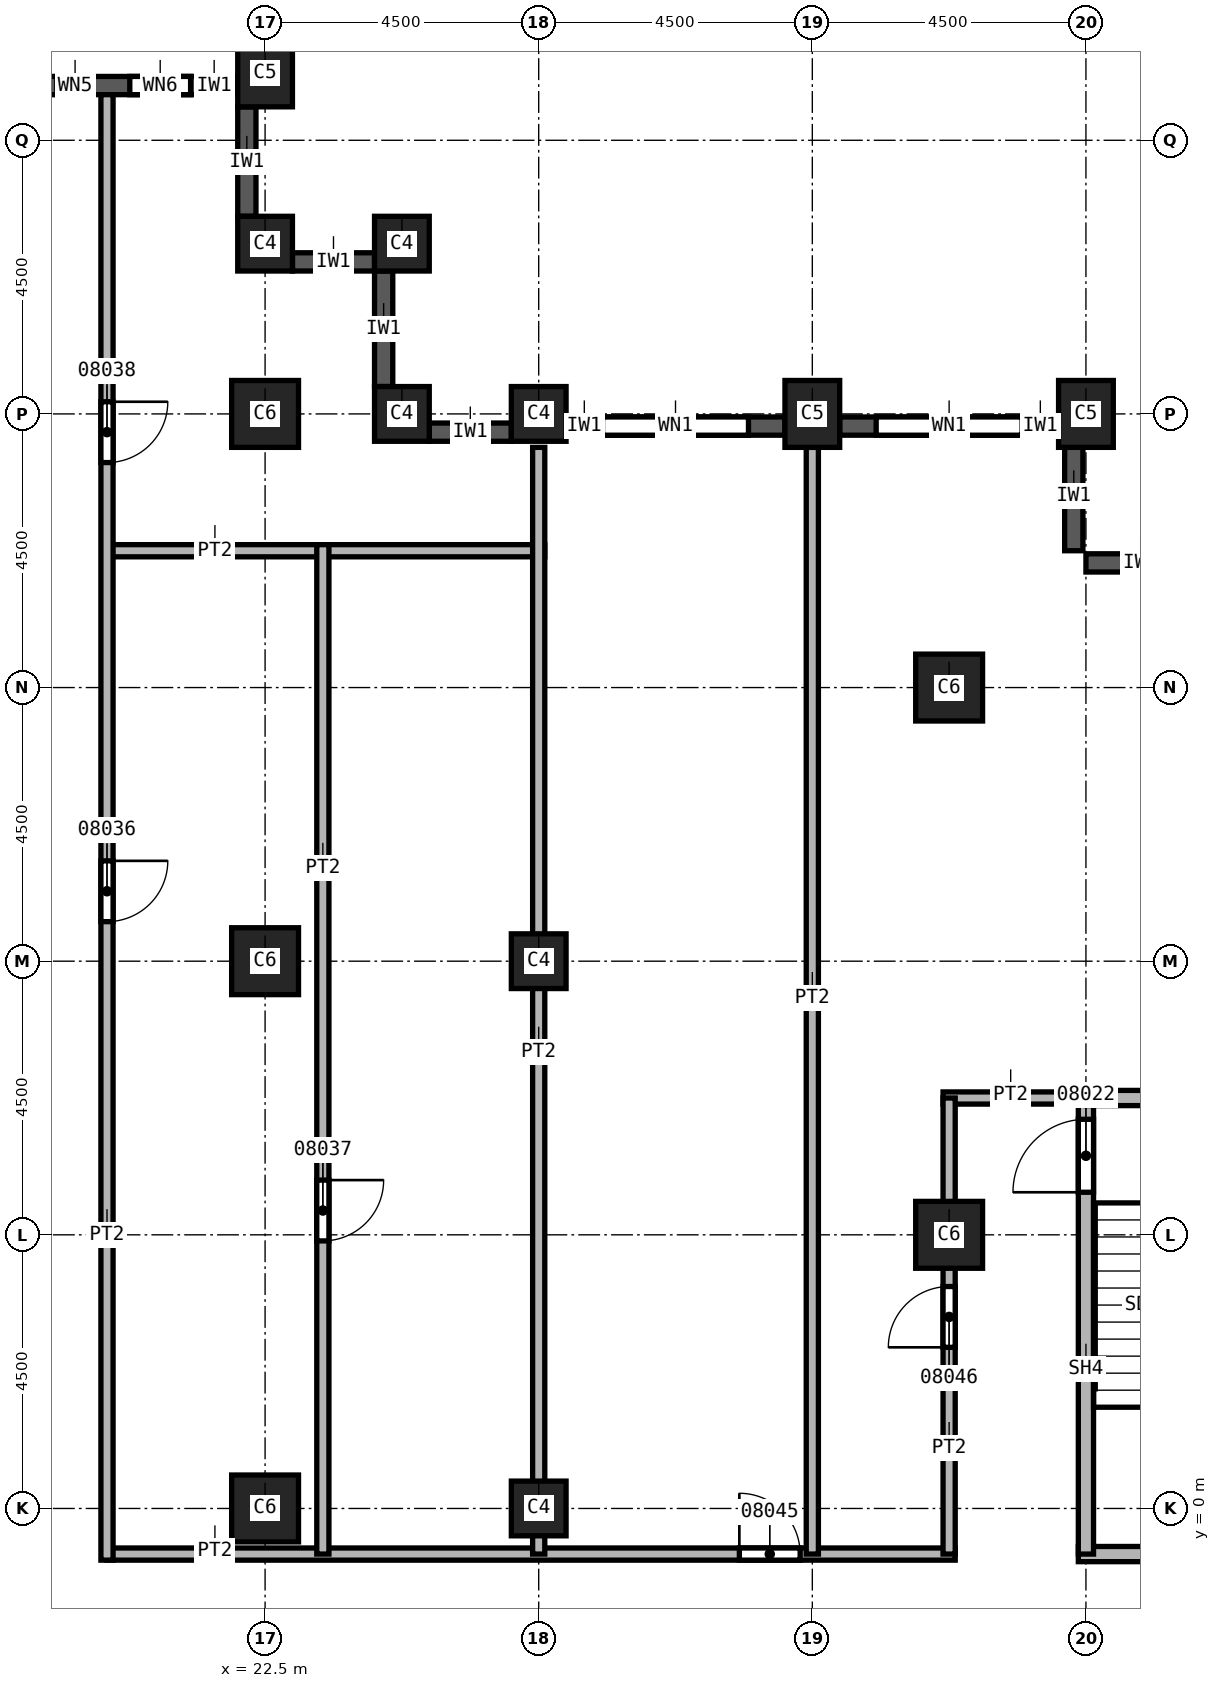
"""IFC4 building model, lengths in metres.
Left out: names, types, materials, properties, quantities, classifications, styles, units other than length and angle.
Written with IfcOpenShell. Run it as: python <this file> out.ifc"""

import sys

from ifc_helpers import new_model, si_unit, direction, frame, frame_2d, origin, origin_2d, place, context, subcontext, project, spatial, rectangle, extrude, element, fill, save


model = new_model("IFC4")
c1 = context("Model", 3, precision=1e-05, world=origin(), true_north=direction((0.0, 1.0)))
c2 = subcontext(c1, "Body", "Model", "MODEL_VIEW")
j1 = project(units=[si_unit("LENGTHUNIT", "METRE"), si_unit("PLANEANGLEUNIT", "RADIAN")], contexts=[c1])
p1 = place(None, origin())
s1 = spatial("IfcSite", under=j1, at=p1, CompositionType="ELEMENT")
p2 = place(p1, origin())
s2 = spatial("IfcBuilding", under=s1, at=p2, CompositionType="ELEMENT")
p3 = place(p2, frame((0.0, 0.0, 150.0)))
s3 = spatial("IfcBuildingStorey", under=s2, at=p3, CompositionType="ELEMENT", Elevation=150.0)
for number, where, z_axis, x_axis in (
    (1, (31.5, 18.0, 0.0), (0.0, 0.0, 1.0), (1.0, 0.0, 0.0)),
    (2, (36.0, 18.0, 0.0), (0.0, 0.0, 1.0), (1.0, 0.0, 0.0)),
):
    element("IfcColumn", number, at=place(p3, frame(where, z_axis=z_axis, x_axis=x_axis)), inside=s3, PredefinedType="COLUMN", context=c2, shape_type="SweptSolid", body=[
        extrude(rectangle(XDim=0.9, YDim=1.1, at=origin_2d()), origin(), (0.0, 0.0, 1.0), 3.7),
    ])
for number, where, z_axis, x_axis in (
    (3, (33.75, 4.5, 0.0), (0.0, 0.0, 1.0), (1.0, 0.0, 0.0)),
    (4, (33.75, 13.5, 0.0), (0.0, 0.0, 1.0), (1.0, 0.0, 0.0)),
    (5, (22.5, 0.0, 0.0), (0.0, 0.0, 1.0), (1.0, 0.0, 0.0)),
    (6, (22.5, 9.0, 0.0), (0.0, 0.0, 1.0), (1.0, 0.0, 0.0)),
    (7, (22.5, 18.0, 0.0), (0.0, 0.0, 1.0), (1.0, 0.0, 0.0)),
):
    element("IfcColumn", number, at=place(p3, frame(where, z_axis=z_axis, x_axis=x_axis)), inside=s3, PredefinedType="COLUMN", context=c2, shape_type="SweptSolid", body=[
        extrude(rectangle(XDim=1.1, YDim=1.1, at=origin_2d()), origin(), (0.0, 0.0, 1.0), 3.7),
    ])
for number, where, z_axis, x_axis in (
    (8, (27.0, 0.0, 0.0), (0.0, 0.0, 1.0), (1.0, 0.0, 0.0)),
    (9, (27.0, 9.0, 0.0), (0.0, 0.0, 1.0), (1.0, 0.0, 0.0)),
    (10, (27.0, 18.0, 0.0), (0.0, 0.0, 1.0), (1.0, 0.0, 0.0)),
):
    element("IfcColumn", number, at=place(p3, frame(where, z_axis=z_axis, x_axis=x_axis)), inside=s3, PredefinedType="COLUMN", context=c2, shape_type="SweptSolid", body=[
        extrude(rectangle(XDim=0.9, YDim=0.9, at=origin_2d()), origin(), (0.0, 0.0, 1.0), 3.7),
    ])
p4 = place(p3, frame((22.5, 23.6, 0.0), z_axis=(0.0, 0.0, 1.0), x_axis=(1.0, 0.0, 0.0)))
e11 = element("IfcColumn", 11, at=p4, inside=s3, PredefinedType="COLUMN", context=c2, shape_type="SweptSolid", body=[
    extrude(rectangle(XDim=0.9, YDim=1.1, at=origin_2d()), origin(), (0.0, 0.0, 1.0), 3.7),
])
for number, where, z_axis, x_axis in (
    (12, (22.5, 20.8, 0.0), (0.0, 0.0, 1.0), (1.0, 0.0, 0.0)),
    (13, (24.75, 20.8, 0.0), (0.0, 0.0, 1.0), (1.0, 0.0, 0.0)),
    (14, (24.75, 18.0, 0.0), (0.0, 0.0, 1.0), (1.0, 0.0, 0.0)),
):
    element("IfcColumn", number, at=place(p3, frame(where, z_axis=z_axis, x_axis=x_axis)), inside=s3, PredefinedType="COLUMN", context=c2, shape_type="SweptSolid", body=[
        extrude(rectangle(XDim=0.9, YDim=0.9, at=origin_2d()), origin(), (0.0, 0.0, 1.0), 3.7),
    ])
for number, where, z_axis, x_axis in (
    (15, (37.8, 15.55, 0.0), (0.0, 0.0, 1.0), (-1.0, 0.0, 0.0)),
    (16, (35.8, 17.55, 0.0), (0.0, 0.0, 1.0), (0.0, -1.0, 0.0)),
):
    element("IfcWall", number, at=place(p3, frame(where, z_axis=z_axis, x_axis=x_axis)), inside=s3, PredefinedType="SOLIDWALL", context=c2, shape_type="SweptSolid", body=[
        extrude(rectangle(XDim=1.8, YDim=0.3, at=frame_2d((0.9, 0.0))), origin(), (0.0, 0.0, 1.0), 3.1),
    ])
p5 = place(p3, frame((35.55, 17.8, 0.0), z_axis=(0.0, 0.0, 1.0), x_axis=(-1.0, 0.0, 0.0)))
e17 = element("IfcWall", 17, at=p5, inside=s3, PredefinedType="SOLIDWALL", context=c2, shape_type="SweptSolid", body=[
    extrude(rectangle(XDim=3.6, YDim=0.3, at=frame_2d((1.8, 0.0))), origin(), (0.0, 0.0, 1.0), 3.1),
])
p6 = place(p5, frame((0.6, 0.0, 0.8)))
e18 = element("IfcOpeningElement", 18, at=p6, cuts=e17, PredefinedType="OPENING", context=c2, shape_type="SweptSolid", body=[
    extrude(rectangle(XDim=2.4, YDim=1.95, at=frame_2d((1.2, 0.975))), frame((0.0, 0.15, 0.0), z_axis=(0.0, -1.0, 0.0), x_axis=(1.0, 0.0, 0.0)), (0.0, 0.0, 1.0), 0.3),
])
p7 = place(p3, frame((31.05, 17.8, 0.0), z_axis=(0.0, 0.0, 1.0), x_axis=(-1.0, 0.0, 0.0)))
e19 = element("IfcWall", 19, at=p7, inside=s3, PredefinedType="SOLIDWALL", context=c2, shape_type="SweptSolid", body=[
    extrude(rectangle(XDim=3.6, YDim=0.3, at=frame_2d((1.8, 0.0))), origin(), (0.0, 0.0, 1.0), 3.1),
])
p8 = place(p7, frame((0.6, 0.0, 0.8)))
e20 = element("IfcOpeningElement", 20, at=p8, cuts=e19, PredefinedType="OPENING", context=c2, shape_type="SweptSolid", body=[
    extrude(rectangle(XDim=2.4, YDim=1.95, at=frame_2d((1.2, 0.975))), frame((0.0, 0.15, 0.0), z_axis=(0.0, -1.0, 0.0), x_axis=(1.0, 0.0, 0.0)), (0.0, 0.0, 1.0), 0.3),
])
p9 = place(p3, frame((26.55, 17.7, 0.0), z_axis=(0.0, 0.0, 1.0), x_axis=(-1.0, 0.0, 0.0)))
e21 = element("IfcWall", 21, at=p9, inside=s3, PredefinedType="SOLIDWALL", context=c2, shape_type="SweptSolid", body=[
    extrude(rectangle(XDim=1.35, YDim=0.3, at=frame_2d((0.675, 0.0))), origin(), (0.0, 0.0, 1.0), 3.1),
])
p10 = place(p3, frame((24.45, 18.45, 0.0), z_axis=(0.0, 0.0, 1.0), x_axis=(0.0, 1.0, 0.0)))
e22 = element("IfcWall", 22, at=p10, inside=s3, PredefinedType="SOLIDWALL", context=c2, shape_type="SweptSolid", body=[
    extrude(rectangle(XDim=1.9, YDim=0.3, at=frame_2d((0.95, 0.0))), origin(), (0.0, 0.0, 1.0), 3.1),
])
p11 = place(p3, frame((24.3, 20.5, 0.0), z_axis=(0.0, 0.0, 1.0), x_axis=(-1.0, 0.0, 0.0)))
e23 = element("IfcWall", 23, at=p11, inside=s3, PredefinedType="SOLIDWALL", context=c2, shape_type="SweptSolid", body=[
    extrude(rectangle(XDim=1.35, YDim=0.3, at=frame_2d((0.675, 0.0))), origin(), (0.0, 0.0, 1.0), 3.1),
])
p12 = place(p3, frame((22.2, 21.25, 0.0), z_axis=(0.0, 0.0, 1.0), x_axis=(0.0, 1.0, 0.0)))
e24 = element("IfcWall", 24, at=p12, inside=s3, PredefinedType="SOLIDWALL", context=c2, shape_type="SweptSolid", body=[
    extrude(rectangle(XDim=1.8, YDim=0.3, at=frame_2d((0.9, 0.0))), origin(), (0.0, 0.0, 1.0), 3.1),
])
p13 = place(p3, frame((22.05, 23.4, 0.0), z_axis=(0.0, 0.0, 1.0), x_axis=(-1.0, 0.0, 0.0)))
e25 = element("IfcWall", 25, at=p13, inside=s3, PredefinedType="SOLIDWALL", context=c2, shape_type="SweptSolid", body=[
    extrude(rectangle(XDim=3.6, YDim=0.3, at=frame_2d((1.8, 0.0))), origin(), (0.0, 0.0, 1.0), 3.1),
])
p14 = place(p13, frame((0.775, 0.0, 0.8)))
e26 = element("IfcOpeningElement", 26, at=p14, cuts=e25, PredefinedType="OPENING", context=c2, shape_type="SweptSolid", body=[
    extrude(rectangle(XDim=1.0, YDim=1.95, at=frame_2d((0.5, 0.975))), frame((0.0, 0.15, 0.0), z_axis=(0.0, -1.0, 0.0), x_axis=(1.0, 0.0, 0.0)), (0.0, 0.0, 1.0), 0.3),
])
p15 = place(p13, frame((2.375, 0.0, 0.8)))
e27 = element("IfcOpeningElement", 27, at=p15, cuts=e25, PredefinedType="OPENING", context=c2, shape_type="SweptSolid", body=[
    extrude(rectangle(XDim=0.6, YDim=1.95, at=frame_2d((0.3, 0.975))), frame((0.0, 0.15, 0.0), z_axis=(0.0, -1.0, 0.0), x_axis=(1.0, 0.0, 0.0)), (0.0, 0.0, 1.0), 0.3),
])
p16 = place(p3, frame((19.9, -0.75, 0.0), z_axis=(0.0, 0.0, 1.0), x_axis=(1.0, 0.0, 0.0)))
e28 = element("IfcWall", 28, at=p16, inside=s3, PredefinedType="PARTITIONING", context=c2, shape_type="SweptSolid", body=[
    extrude(rectangle(XDim=13.95, YDim=0.2, at=frame_2d((6.975, 0.0))), origin(), (0.0, 0.0, 1.0), 3.7),
])
p17 = place(p16, frame((10.4, 0.0, 0.0)))
e29 = element("IfcOpeningElement", 29, at=p17, cuts=e28, PredefinedType="OPENING", context=c2, shape_type="SweptSolid", body=[
    extrude(rectangle(XDim=1.0, YDim=2.1, at=frame_2d((0.5, 1.05))), frame((0.0, 0.1, 0.0), z_axis=(0.0, -1.0, 0.0), x_axis=(1.0, 0.0, 0.0)), (0.0, 0.0, 1.0), 0.2),
])
p18 = place(p3, frame((19.9, 15.75, 0.0), z_axis=(0.0, 0.0, 1.0), x_axis=(1.0, 0.0, 0.0)))
e30 = element("IfcWall", 30, at=p18, inside=s3, PredefinedType="PARTITIONING", context=c2, shape_type="SweptSolid", body=[
    extrude(rectangle(XDim=7.2, YDim=0.2, at=frame_2d((3.6, 0.0))), origin(), (0.0, 0.0, 1.0), 3.7),
])
p19 = place(p3, frame((19.9, 23.25, 0.0), z_axis=(0.0, 0.0, 1.0), x_axis=(0.0, -1.0, 0.0)))
e31 = element("IfcWall", 31, at=p19, inside=s3, PredefinedType="PARTITIONING", context=c2, shape_type="SweptSolid", body=[
    extrude(rectangle(XDim=24.1, YDim=0.2, at=frame_2d((12.05, 0.0))), origin(), (0.0, 0.0, 1.0), 3.7),
])
p20 = place(p19, frame((12.6, 0.0, 0.0)))
e32 = element("IfcOpeningElement", 32, at=p20, cuts=e31, PredefinedType="OPENING", context=c2, shape_type="SweptSolid", body=[
    extrude(rectangle(XDim=1.0, YDim=2.1, at=frame_2d((0.5, 1.05))), frame((0.0, 0.1, 0.0), z_axis=(0.0, -1.0, 0.0), x_axis=(1.0, 0.0, 0.0)), (0.0, 0.0, 1.0), 0.2),
])
p21 = place(p19, frame((5.05, 0.0, 0.0)))
e33 = element("IfcOpeningElement", 33, at=p21, cuts=e31, PredefinedType="OPENING", context=c2, shape_type="SweptSolid", body=[
    extrude(rectangle(XDim=1.0, YDim=2.1, at=frame_2d((0.5, 1.05))), frame((0.0, 0.1, 0.0), z_axis=(0.0, -1.0, 0.0), x_axis=(1.0, 0.0, 0.0)), (0.0, 0.0, 1.0), 0.2),
])
p22 = place(p3, frame((23.45, 15.85, 0.0), z_axis=(0.0, 0.0, 1.0), x_axis=(0.0, -1.0, 0.0)))
e34 = element("IfcWall", 34, at=p22, inside=s3, PredefinedType="PARTITIONING", context=c2, shape_type="SweptSolid", body=[
    extrude(rectangle(XDim=16.6, YDim=0.2, at=frame_2d((8.3, 0.0))), origin(), (0.0, 0.0, 1.0), 3.7),
])
p23 = place(p22, frame((10.45, 0.0, 0.0)))
e35 = element("IfcOpeningElement", 35, at=p23, cuts=e34, PredefinedType="OPENING", context=c2, shape_type="SweptSolid", body=[
    extrude(rectangle(XDim=1.0, YDim=2.1, at=frame_2d((0.5, 1.05))), frame((0.0, 0.1, 0.0), z_axis=(0.0, -1.0, 0.0), x_axis=(1.0, 0.0, 0.0)), (0.0, 0.0, 1.0), 0.2),
])
for number, where, z_axis, x_axis in (
    (36, (27.0, 17.45, 0.0), (0.0, 0.0, 1.0), (0.0, -1.0, 0.0)),
    (37, (31.5, 17.45, 0.0), (0.0, 0.0, 1.0), (0.0, -1.0, 0.0)),
):
    element("IfcWall", number, at=place(p3, frame(where, z_axis=z_axis, x_axis=x_axis)), inside=s3, PredefinedType="PARTITIONING", context=c2, shape_type="SweptSolid", body=[
        extrude(rectangle(XDim=18.2, YDim=0.2, at=frame_2d((9.1, 0.0))), origin(), (0.0, 0.0, 1.0), 3.7),
    ])
p24 = place(p3, frame((33.65, 6.75, 0.0), z_axis=(0.0, 0.0, 1.0), x_axis=(1.0, 0.0, 0.0)))
e38 = element("IfcWall", 38, at=p24, inside=s3, PredefinedType="PARTITIONING", context=c2, shape_type="SweptSolid", body=[
    extrude(rectangle(XDim=2.35, YDim=0.2, at=frame_2d((1.175, 0.0))), origin(), (0.0, 0.0, 1.0), 3.7),
])
p25 = place(p3, frame((33.75, -0.75, 0.0), z_axis=(0.0, 0.0, 1.0), x_axis=(0.0, 1.0, 0.0)))
e39 = element("IfcWall", 39, at=p25, inside=s3, PredefinedType="PARTITIONING", context=c2, shape_type="SweptSolid", body=[
    extrude(rectangle(XDim=7.5, YDim=0.2, at=frame_2d((3.75, 0.0))), origin(), (0.0, 0.0, 1.0), 3.7),
])
p26 = place(p25, frame((3.4, 0.0, 0.0)))
e40 = element("IfcOpeningElement", 40, at=p26, cuts=e39, PredefinedType="OPENING", context=c2, shape_type="SweptSolid", body=[
    extrude(rectangle(XDim=1.0, YDim=2.1, at=frame_2d((0.5, 1.05))), frame((0.0, 0.1, 0.0), z_axis=(0.0, -1.0, 0.0), x_axis=(1.0, 0.0, 0.0)), (0.0, 0.0, 1.0), 0.2),
])
p27 = place(p3, frame((35.875, -0.75, 0.0), z_axis=(0.0, 0.0, 1.0), x_axis=(1.0, 0.0, 0.0)))
e41 = element("IfcWall", 41, at=p27, inside=s3, PredefinedType="SOLIDWALL", context=c2, shape_type="SweptSolid", body=[
    extrude(rectangle(XDim=4.275, YDim=0.25, at=frame_2d((2.137, 0.0))), origin(), (0.0, 0.0, 1.0), 3.7),
])
p28 = place(p3, frame((36.0, -0.75, 0.0), z_axis=(0.0, 0.0, 1.0), x_axis=(0.0, 1.0, 0.0)))
e42 = element("IfcWall", 42, at=p28, inside=s3, PredefinedType="SOLIDWALL", context=c2, shape_type="SweptSolid", body=[
    extrude(rectangle(XDim=7.625, YDim=0.25, at=frame_2d((3.812, 0.0))), origin(), (0.0, 0.0, 1.0), 3.7),
])
p29 = place(p28, frame((5.95, 0.0, 0.0)))
e43 = element("IfcOpeningElement", 43, at=p29, cuts=e42, PredefinedType="OPENING", context=c2, shape_type="SweptSolid", body=[
    extrude(rectangle(XDim=1.2, YDim=2.1, at=frame_2d((0.6, 1.05))), frame((0.0, 0.125, 0.0), z_axis=(0.0, -1.0, 0.0), x_axis=(1.0, 0.0, 0.0)), (0.0, 0.0, 1.0), 0.25),
])
p30 = place(p3, frame((36.0, 6.75, 0.0), z_axis=(0.0, 0.0, 1.0), x_axis=(1.0, 0.0, 0.0)))
e44 = element("IfcWall", 44, at=p30, inside=s3, PredefinedType="SOLIDWALL", context=c2, shape_type="SweptSolid", body=[
    extrude(rectangle(XDim=4.15, YDim=0.25, at=frame_2d((2.075, 0.0))), origin(), (0.0, 0.0, 1.0), 3.7),
])
p31 = place(p6, origin())
e45 = element("IfcWindow", 45, at=p31, inside=s3, PartitioningType="SINGLE_PANEL", PredefinedType="WINDOW", context=c2, shape_type="SweptSolid", body=[
    extrude(rectangle(XDim=2.4, YDim=1.95, at=frame_2d((1.2, 0.975))), frame((0.0, 0.03, 0.0), z_axis=(0.0, -1.0, 0.0), x_axis=(1.0, 0.0, 0.0)), (0.0, 0.0, 1.0), 0.06),
])
fill(e18, e45)
p32 = place(p8, origin())
e46 = element("IfcWindow", 46, at=p32, inside=s3, PartitioningType="SINGLE_PANEL", PredefinedType="WINDOW", context=c2, shape_type="SweptSolid", body=[
    extrude(rectangle(XDim=2.4, YDim=1.95, at=frame_2d((1.2, 0.975))), frame((0.0, 0.03, 0.0), z_axis=(0.0, -1.0, 0.0), x_axis=(1.0, 0.0, 0.0)), (0.0, 0.0, 1.0), 0.06),
])
fill(e20, e46)
p33 = place(p29, origin())
e47 = element("IfcDoor", 47, at=p33, inside=s3, OperationType="SINGLE_SWING_LEFT", PredefinedType="DOOR", context=c2, shape_type="SweptSolid", body=[
    extrude(rectangle(XDim=1.2, YDim=2.1, at=frame_2d((0.6, 1.05))), frame((0.0, 0.025, 0.0), z_axis=(0.0, -1.0, 0.0), x_axis=(1.0, 0.0, 0.0)), (0.0, 0.0, 1.0), 0.05),
])
fill(e43, e47)
p34 = place(p20, origin())
e48 = element("IfcDoor", 48, at=p34, inside=s3, OperationType="SINGLE_SWING_LEFT", PredefinedType="DOOR", context=c2, shape_type="SweptSolid", body=[
    extrude(rectangle(XDim=1.0, YDim=2.1, at=frame_2d((0.5, 1.05))), frame((0.0, 0.025, 0.0), z_axis=(0.0, -1.0, 0.0), x_axis=(1.0, 0.0, 0.0)), (0.0, 0.0, 1.0), 0.05),
])
fill(e32, e48)
p35 = place(p23, origin())
e49 = element("IfcDoor", 49, at=p35, inside=s3, OperationType="SINGLE_SWING_RIGHT", PredefinedType="DOOR", context=c2, shape_type="SweptSolid", body=[
    extrude(rectangle(XDim=1.0, YDim=2.1, at=frame_2d((0.5, 1.05))), frame((0.0, 0.025, 0.0), z_axis=(0.0, -1.0, 0.0), x_axis=(1.0, 0.0, 0.0)), (0.0, 0.0, 1.0), 0.05),
])
fill(e35, e49)
p36 = place(p21, origin())
e50 = element("IfcDoor", 50, at=p36, inside=s3, OperationType="SINGLE_SWING_LEFT", PredefinedType="DOOR", context=c2, shape_type="SweptSolid", body=[
    extrude(rectangle(XDim=1.0, YDim=2.1, at=frame_2d((0.5, 1.05))), frame((0.0, 0.025, 0.0), z_axis=(0.0, -1.0, 0.0), x_axis=(1.0, 0.0, 0.0)), (0.0, 0.0, 1.0), 0.05),
])
fill(e33, e50)
p37 = place(p17, origin())
e51 = element("IfcDoor", 51, at=p37, inside=s3, OperationType="SINGLE_SWING_RIGHT", PredefinedType="DOOR", context=c2, shape_type="SweptSolid", body=[
    extrude(rectangle(XDim=1.0, YDim=2.1, at=frame_2d((0.5, 1.05))), frame((0.0, 0.025, 0.0), z_axis=(0.0, -1.0, 0.0), x_axis=(1.0, 0.0, 0.0)), (0.0, 0.0, 1.0), 0.05),
])
fill(e29, e51)
p38 = place(p26, origin())
e52 = element("IfcDoor", 52, at=p38, inside=s3, OperationType="SINGLE_SWING_LEFT", PredefinedType="DOOR", context=c2, shape_type="SweptSolid", body=[
    extrude(rectangle(XDim=1.0, YDim=2.1, at=frame_2d((0.5, 1.05))), frame((0.0, 0.025, 0.0), z_axis=(0.0, -1.0, 0.0), x_axis=(1.0, 0.0, 0.0)), (0.0, 0.0, 1.0), 0.05),
])
fill(e40, e52)
p39 = place(p14, origin())
e53 = element("IfcWindow", 53, at=p39, inside=s3, PartitioningType="SINGLE_PANEL", PredefinedType="WINDOW", context=c2, shape_type="SweptSolid", body=[
    extrude(rectangle(XDim=1.0, YDim=1.95, at=frame_2d((0.5, 0.975))), frame((0.0, 0.03, 0.0), z_axis=(0.0, -1.0, 0.0), x_axis=(1.0, 0.0, 0.0)), (0.0, 0.0, 1.0), 0.06),
])
fill(e26, e53)
p40 = place(p15, origin())
e54 = element("IfcWindow", 54, at=p40, inside=s3, PartitioningType="SINGLE_PANEL", PredefinedType="WINDOW", context=c2, shape_type="SweptSolid", body=[
    extrude(rectangle(XDim=0.6, YDim=1.95, at=frame_2d((0.3, 0.975))), frame((0.0, 0.03, 0.0), z_axis=(0.0, -1.0, 0.0), x_axis=(1.0, 0.0, 0.0)), (0.0, 0.0, 1.0), 0.06),
])
fill(e27, e54)
save(model, sys.argv[1])
